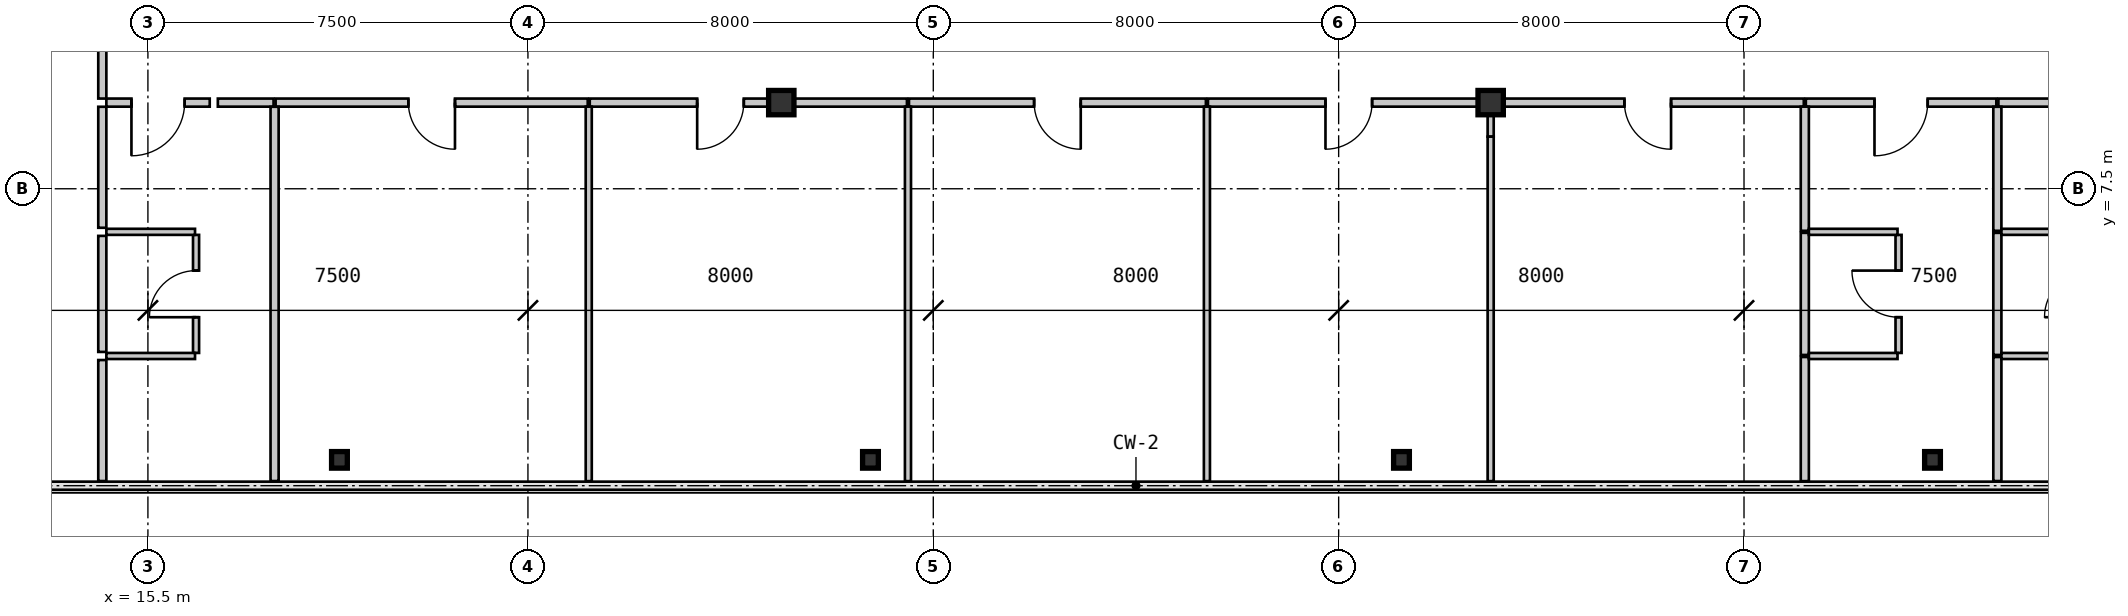
"""IFC4 building model, lengths in metres.
Left out: names, types, materials, properties, quantities, classifications, styles, units other than length and angle.
Written with IfcOpenShell. Run it as: python <this file> out.ifc"""

import sys

from ifc_helpers import new_model, si_unit, direction, frame, frame_2d, origin, origin_2d, place, context, subcontext, project, spatial, rectangle, i_section, extrude, source, transform, mapped, element, fill, save


model = new_model("IFC4")
c1 = context("Model", 3, precision=1e-05, world=origin(), true_north=direction((0.0, 1.0)))
c2 = subcontext(c1, "Body", "Model", "MODEL_VIEW")
j1 = project(units=[si_unit("LENGTHUNIT", "METRE"), si_unit("PLANEANGLEUNIT", "RADIAN")], contexts=[c1])
p1 = place(None, origin())
s1 = spatial("IfcSite", under=j1, at=p1, CompositionType="ELEMENT")
p2 = place(p1, origin())
s2 = spatial("IfcBuilding", under=s1, at=p2, CompositionType="ELEMENT")
p3 = place(p2, frame((0.0, 0.0, 51.45)))
s3 = spatial("IfcBuildingStorey", under=s2, at=p3, CompositionType="ELEMENT", Elevation=51.45)
m1 = source(origin(), c2, "Body", "SweptSolid", [
    extrude(i_section(OverallWidth=0.5, OverallDepth=0.48, WebThickness=0.028, FlangeThickness=0.044, at=origin_2d()), origin(), (0.0, 0.0, 1.0), 3.15),
])
for number, where, z_axis, x_axis in (
    (1, (28.0, 9.2, 0.0), (0.0, 0.0, 1.0), (1.0, 0.0, 0.0)),
    (2, (42.0, 9.2, 0.0), (0.0, 0.0, 1.0), (1.0, 0.0, 0.0)),
):
    element("IfcColumn", number, at=place(p3, frame(where, z_axis=z_axis, x_axis=x_axis)), inside=s3, PredefinedType="COLUMN", context=c2, shape_type="MappedRepresentation", body=[
        mapped(m1, transform((0.0, 0.0, 0.0), scale=1.0)),
    ])
m2 = source(origin(), c2, "Body", "SweptSolid", [
    extrude(i_section(OverallWidth=0.311, OverallDepth=0.327, WebThickness=0.016, FlangeThickness=0.025, at=origin_2d()), origin(), (0.0, 0.0, 1.0), 3.15),
])
for number, where, z_axis, x_axis in (
    (3, (19.28, 2.15, 0.0), (0.0, 0.0, 1.0), (1.0, 0.0, 0.0)),
    (4, (29.76, 2.15, 0.0), (0.0, 0.0, 1.0), (1.0, 0.0, 0.0)),
    (5, (40.24, 2.15, 0.0), (0.0, 0.0, 1.0), (1.0, 0.0, 0.0)),
    (6, (50.72, 2.15, 0.0), (0.0, 0.0, 1.0), (1.0, 0.0, 0.0)),
):
    element("IfcColumn", number, at=place(p3, frame(where, z_axis=z_axis, x_axis=x_axis)), inside=s3, PredefinedType="COLUMN", context=c2, shape_type="MappedRepresentation", body=[
        mapped(m2, transform((0.0, 0.0, 0.0), scale=1.0)),
    ])
m3 = source(origin(), c2, "Body", "SweptSolid", [
    extrude(rectangle(XDim=2.04, YDim=0.16, at=frame_2d((1.02, 0.0))), origin(), (0.0, 0.0, 1.0), 2.93),
])
p4 = place(p3, frame((16.72, 9.2, 0.0), z_axis=(0.0, 0.0, 1.0), x_axis=(-1.0, 0.0, 0.0)))
e7 = element("IfcWall", 7, at=p4, inside=s3, PredefinedType="PARTITIONING", context=c2, shape_type="MappedRepresentation", body=[
    mapped(m3, transform((0.0, 0.0, 0.0), scale=1.0)),
])
m4 = source(origin(), c2, "Body", "SweptSolid", [
    extrude(rectangle(XDim=1.05, YDim=2.1, at=frame_2d((0.525, 1.05))), frame((0.0, 0.09, 0.0), z_axis=(0.0, -1.0, 0.0), x_axis=(1.0, 0.0, 0.0)), (0.0, 0.0, 1.0), 0.18),
])
p5 = place(p4, frame((0.495, 0.0, 0.0)))
e8 = element("IfcOpeningElement", 8, at=p5, cuts=e7, PredefinedType="OPENING", context=c2, shape_type="MappedRepresentation", body=[
    mapped(m4, transform((0.0, 0.0, 0.0), scale=1.0)),
])
m5 = source(origin(), c2, "Body", "SweptSolid", [
    extrude(rectangle(XDim=8.7, YDim=0.16, at=frame_2d((4.35, 0.0))), origin(), (0.0, 0.0, 1.0), 2.93),
])
p6 = place(p3, frame((14.6, 9.28, 0.0), z_axis=(0.0, 0.0, 1.0), x_axis=(0.0, 1.0, 0.0)))
e9 = element("IfcWall", 9, at=p6, inside=s3, PredefinedType="PARTITIONING", context=c2, shape_type="MappedRepresentation", body=[
    mapped(m5, transform((0.0, 0.0, 0.0), scale=1.0)),
])
m6 = source(origin(), c2, "Body", "SweptSolid", [
    extrude(rectangle(XDim=0.92, YDim=2.1, at=frame_2d((0.46, 1.05))), frame((0.0, 0.09, 0.0), z_axis=(0.0, -1.0, 0.0), x_axis=(1.0, 0.0, 0.0)), (0.0, 0.0, 1.0), 0.18),
])
p7 = place(p6, frame((3.89, 0.0, 0.0)))
e10 = element("IfcOpeningElement", 10, at=p7, cuts=e9, PredefinedType="OPENING", context=c2, shape_type="MappedRepresentation", body=[
    mapped(m6, transform((0.0, 0.0, 0.0), scale=1.0)),
])
m7 = source(origin(), c2, "Body", "SweptSolid", [
    extrude(rectangle(XDim=1.1, YDim=0.16, at=frame_2d((0.55, 0.0))), origin(), (0.0, 0.0, 1.0), 2.93),
])
p8 = place(p3, frame((17.98, 9.2, 0.0), z_axis=(0.0, 0.0, 1.0), x_axis=(-1.0, 0.0, 0.0)))
e11 = element("IfcWall", 11, at=p8, inside=s3, PredefinedType="PARTITIONING", context=c2, shape_type="MappedRepresentation", body=[
    mapped(m7, transform((0.0, 0.0, 0.0), scale=1.0)),
])
m8 = source(origin(), c2, "Body", "SweptSolid", [
    extrude(rectangle(XDim=6.159, YDim=0.16, at=frame_2d((3.08, 0.0))), origin(), (0.0, 0.0, 1.0), 2.93),
])
p9 = place(p3, frame((24.18, 9.2, 0.0), z_axis=(0.0, 0.0, 1.0), x_axis=(-1.0, 0.0, 0.0)))
e12 = element("IfcWall", 12, at=p9, inside=s3, PredefinedType="PARTITIONING", context=c2, shape_type="MappedRepresentation", body=[
    mapped(m8, transform((0.0, 0.0, 0.0), scale=1.0)),
])
p10 = place(p9, frame((2.62, 0.0, 0.0)))
e13 = element("IfcOpeningElement", 13, at=p10, cuts=e12, PredefinedType="OPENING", context=c2, shape_type="MappedRepresentation", body=[
    mapped(m6, transform((0.0, 0.0, 0.0), scale=1.0)),
])
m9 = source(origin(), c2, "Body", "SweptSolid", [
    extrude(rectangle(XDim=2.48, YDim=0.16, at=frame_2d((1.24, 0.0))), origin(), (0.0, 0.0, 1.0), 2.328),
])
p11 = place(p3, frame((30.48, 9.2, 0.0), z_axis=(0.0, 0.0, 1.0), x_axis=(-1.0, 0.0, 0.0)))
e14 = element("IfcWall", 14, at=p11, inside=s3, PredefinedType="PARTITIONING", context=c2, shape_type="MappedRepresentation", body=[
    mapped(m9, transform((0.0, 0.0, 0.0), scale=1.0)),
])
m10 = source(origin(), c2, "Body", "SweptSolid", [
    extrude(rectangle(XDim=3.78, YDim=0.16, at=frame_2d((1.89, 0.0))), origin(), (0.0, 0.0, 1.0), 2.93),
])
p12 = place(p3, frame((28.0, 9.2, 0.0), z_axis=(0.0, 0.0, 1.0), x_axis=(-1.0, 0.0, 0.0)))
e15 = element("IfcWall", 15, at=p12, inside=s3, PredefinedType="PARTITIONING", context=c2, shape_type="MappedRepresentation", body=[
    mapped(m10, transform((0.0, 0.0, 0.0), scale=1.0)),
])
p13 = place(p12, frame((0.74, 0.0, 0.0)))
e16 = element("IfcOpeningElement", 16, at=p13, cuts=e15, PredefinedType="OPENING", context=c2, shape_type="MappedRepresentation", body=[
    mapped(m6, transform((0.0, 0.0, 0.0), scale=1.0)),
])
m11 = source(origin(), c2, "Body", "SweptSolid", [
    extrude(rectangle(XDim=5.86, YDim=0.16, at=frame_2d((2.93, 0.0))), origin(), (0.0, 0.0, 1.0), 2.328),
])
p14 = place(p3, frame((36.38, 9.2, 0.0), z_axis=(0.0, 0.0, 1.0), x_axis=(-1.0, 0.0, 0.0)))
e17 = element("IfcWall", 17, at=p14, inside=s3, PredefinedType="PARTITIONING", context=c2, shape_type="MappedRepresentation", body=[
    mapped(m11, transform((0.0, 0.0, 0.0), scale=1.0)),
])
p15 = place(p14, frame((2.47, 0.0, 0.0)))
e18 = element("IfcOpeningElement", 18, at=p15, cuts=e17, PredefinedType="OPENING", context=c2, shape_type="MappedRepresentation", body=[
    mapped(m6, transform((0.0, 0.0, 0.0), scale=1.0)),
])
m12 = source(origin(), c2, "Body", "SweptSolid", [
    extrude(rectangle(XDim=5.56, YDim=0.16, at=frame_2d((2.78, 0.0))), origin(), (0.0, 0.0, 1.0), 2.328),
])
p16 = place(p3, frame((41.98, 9.2, 0.0), z_axis=(0.0, 0.0, 1.0), x_axis=(-1.0, 0.0, 0.0)))
e19 = element("IfcWall", 19, at=p16, inside=s3, PredefinedType="PARTITIONING", context=c2, shape_type="MappedRepresentation", body=[
    mapped(m12, transform((0.0, 0.0, 0.0), scale=1.0)),
])
p17 = place(p16, frame((2.32, 0.0, 0.0)))
e20 = element("IfcOpeningElement", 20, at=p17, cuts=e19, PredefinedType="OPENING", context=c2, shape_type="MappedRepresentation", body=[
    mapped(m6, transform((0.0, 0.0, 0.0), scale=1.0)),
])
p18 = place(p3, frame((48.18, 9.2, 0.0), z_axis=(0.0, 0.0, 1.0), x_axis=(-1.0, 0.0, 0.0)))
e21 = element("IfcWall", 21, at=p18, inside=s3, PredefinedType="PARTITIONING", context=c2, shape_type="MappedRepresentation", body=[
    mapped(m8, transform((0.0, 0.0, 0.0), scale=1.0)),
])
p19 = place(p18, frame((2.62, 0.0, 0.0)))
e22 = element("IfcOpeningElement", 22, at=p19, cuts=e21, PredefinedType="OPENING", context=c2, shape_type="MappedRepresentation", body=[
    mapped(m6, transform((0.0, 0.0, 0.0), scale=1.0)),
])
m13 = source(origin(), c2, "Body", "SweptSolid", [
    extrude(rectangle(XDim=3.76, YDim=0.16, at=frame_2d((1.88, 0.0))), origin(), (0.0, 0.0, 1.0), 2.93),
])
p20 = place(p3, frame((51.98, 9.2, 0.0), z_axis=(0.0, 0.0, 1.0), x_axis=(-1.0, 0.0, 0.0)))
e23 = element("IfcWall", 23, at=p20, inside=s3, PredefinedType="PARTITIONING", context=c2, shape_type="MappedRepresentation", body=[
    mapped(m13, transform((0.0, 0.0, 0.0), scale=1.0)),
])
p21 = place(p20, frame((1.355, 0.0, 0.0)))
e24 = element("IfcOpeningElement", 24, at=p21, cuts=e23, PredefinedType="OPENING", context=c2, shape_type="MappedRepresentation", body=[
    mapped(m4, transform((0.0, 0.0, 0.0), scale=1.0)),
])
p22 = place(p3, frame((53.12, 9.2, 0.0), z_axis=(0.0, 0.0, 1.0), x_axis=(-1.0, 0.0, 0.0)))
e25 = element("IfcWall", 25, at=p22, inside=s3, PredefinedType="PARTITIONING", context=c2, shape_type="MappedRepresentation", body=[
    mapped(m7, transform((0.0, 0.0, 0.0), scale=1.0)),
])
m14 = source(origin(), c2, "Body", "SweptSolid", [
    extrude(rectangle(XDim=2.33, YDim=0.12, at=frame_2d((1.165, 0.0))), origin(), (0.0, 0.0, 1.0), 2.93),
])
p23 = place(p3, frame((16.45, 4.26, 0.0), z_axis=(0.0, 0.0, 1.0), x_axis=(0.0, 1.0, 0.0)))
e26 = element("IfcWall", 26, at=p23, inside=s3, PredefinedType="PARTITIONING", context=c2, shape_type="MappedRepresentation", body=[
    mapped(m14, transform((0.0, 0.0, 0.0), scale=1.0)),
])
m15 = source(origin(), c2, "Body", "SweptSolid", [
    extrude(rectangle(XDim=0.92, YDim=2.1, at=frame_2d((0.46, 1.05))), frame((0.0, 0.07, 0.0), z_axis=(0.0, -1.0, 0.0), x_axis=(1.0, 0.0, 0.0)), (0.0, 0.0, 1.0), 0.14),
])
p24 = place(p23, frame((0.705, 0.0, 0.0)))
e27 = element("IfcOpeningElement", 27, at=p24, cuts=e26, PredefinedType="OPENING", context=c2, shape_type="MappedRepresentation", body=[
    mapped(m15, transform((0.0, 0.0, 0.0), scale=1.0)),
])
m16 = source(origin(), c2, "Body", "SweptSolid", [
    extrude(rectangle(XDim=1.75, YDim=0.12, at=frame_2d((0.875, 0.0))), origin(), (0.0, 0.0, 1.0), 2.93),
])
for number, where, z_axis, x_axis in (
    (28, (14.68, 4.2, 0.0), (0.0, 0.0, 1.0), (1.0, 0.0, 0.0)),
    (29, (16.43, 6.65, 0.0), (0.0, 0.0, 1.0), (-1.0, 0.0, 0.0)),
):
    element("IfcWall", number, at=place(p3, frame(where, z_axis=z_axis, x_axis=x_axis)), inside=s3, PredefinedType="PARTITIONING", context=c2, shape_type="MappedRepresentation", body=[
        mapped(m16, transform((0.0, 0.0, 0.0), scale=1.0)),
    ])
m17 = source(origin(), c2, "Body", "SweptSolid", [
    extrude(rectangle(XDim=7.386, YDim=0.16, at=frame_2d((3.693, 0.0))), origin(), (0.0, 0.0, 1.0), 2.93),
])
p25 = place(p3, frame((18.0, 9.118, 0.0), z_axis=(0.0, 0.0, 1.0), x_axis=(0.0, -1.0, 0.0)))
e30 = element("IfcWall", 30, at=p25, inside=s3, PredefinedType="PARTITIONING", context=c2, shape_type="MappedRepresentation", body=[
    mapped(m17, transform((0.0, 0.0, 0.0), scale=1.0)),
])
m18 = source(origin(), c2, "Body", "SweptSolid", [
    extrude(rectangle(XDim=2.388, YDim=0.16, at=frame_2d((1.194, 0.0))), origin(), (0.0, 0.0, 1.0), 2.93),
])
p26 = place(p3, frame((14.6, 1.732, 0.0), z_axis=(0.0, 0.0, 1.0), x_axis=(0.0, 1.0, 0.0)))
e31 = element("IfcWall", 31, at=p26, inside=s3, PredefinedType="PARTITIONING", context=c2, shape_type="MappedRepresentation", body=[
    mapped(m18, transform((0.0, 0.0, 0.0), scale=1.0)),
])
m19 = source(origin(), c2, "Body", "SweptSolid", [
    extrude(rectangle(XDim=2.388, YDim=0.16, at=frame_2d((1.194, 0.0))), origin(), (0.0, 0.0, 1.0), 2.93),
])
p27 = place(p3, frame((14.6, 6.73, 0.0), z_axis=(0.0, 0.0, 1.0), x_axis=(0.0, 1.0, 0.0)))
e32 = element("IfcWall", 32, at=p27, inside=s3, PredefinedType="PARTITIONING", context=c2, shape_type="MappedRepresentation", body=[
    mapped(m19, transform((0.0, 0.0, 0.0), scale=1.0)),
])
m20 = source(origin(), c2, "Body", "SweptSolid", [
    extrude(rectangle(XDim=2.29, YDim=0.16, at=frame_2d((1.145, 0.0))), origin(), (0.0, 0.0, 1.0), 2.93),
])
p28 = place(p3, frame((14.6, 4.28, 0.0), z_axis=(0.0, 0.0, 1.0), x_axis=(0.0, 1.0, 0.0)))
e33 = element("IfcWall", 33, at=p28, inside=s3, PredefinedType="PARTITIONING", context=c2, shape_type="MappedRepresentation", body=[
    mapped(m20, transform((0.0, 0.0, 0.0), scale=1.0)),
])
m21 = source(origin(), c2, "Body", "SweptSolid", [
    extrude(rectangle(XDim=7.39, YDim=0.12, at=frame_2d((3.695, 0.0))), origin(), (0.0, 0.0, 1.0), 2.93),
])
for number, where, z_axis, x_axis in (
    (34, (24.2, 9.12, 0.0), (0.0, 0.0, 1.0), (0.0, -1.0, 0.0)),
    (35, (30.5, 9.12, 0.0), (0.0, 0.0, 1.0), (0.0, -1.0, 0.0)),
    (36, (36.4, 9.12, 0.0), (0.0, 0.0, 1.0), (0.0, -1.0, 0.0)),
):
    element("IfcWall", number, at=place(p3, frame(where, z_axis=z_axis, x_axis=x_axis)), inside=s3, PredefinedType="PARTITIONING", context=c2, shape_type="MappedRepresentation", body=[
        mapped(m21, transform((0.0, 0.0, 0.0), scale=1.0)),
    ])
m22 = source(origin(), c2, "Body", "SweptSolid", [
    extrude(rectangle(XDim=0.592, YDim=0.12, at=frame_2d((0.296, 0.0))), origin(), (0.0, 0.0, 1.0), 2.397),
])
p29 = place(p3, frame((42.0, 9.12, 0.0), z_axis=(0.0, 0.0, 1.0), x_axis=(0.0, -1.0, 0.0)))
e37 = element("IfcWall", 37, at=p29, inside=s3, PredefinedType="PARTITIONING", context=c2, shape_type="MappedRepresentation", body=[
    mapped(m22, transform((0.0, 0.0, 0.0), scale=1.0)),
])
m23 = source(origin(), c2, "Body", "SweptSolid", [
    extrude(rectangle(XDim=6.798, YDim=0.12, at=frame_2d((3.399, 0.0))), origin(), (0.0, 0.0, 1.0), 2.93),
])
p30 = place(p3, frame((42.0, 8.528, 0.0), z_axis=(0.0, 0.0, 1.0), x_axis=(0.0, -1.0, 0.0)))
e38 = element("IfcWall", 38, at=p30, inside=s3, PredefinedType="PARTITIONING", context=c2, shape_type="MappedRepresentation", body=[
    mapped(m23, transform((0.0, 0.0, 0.0), scale=1.0)),
])
m24 = source(origin(), c2, "Body", "SweptSolid", [
    extrude(rectangle(XDim=2.45, YDim=0.16, at=frame_2d((1.225, 0.0))), origin(), (0.0, 0.0, 1.0), 2.93),
])
p31 = place(p3, frame((48.2, 4.18, 0.0), z_axis=(0.0, 0.0, 1.0), x_axis=(0.0, -1.0, 0.0)))
e39 = element("IfcWall", 39, at=p31, inside=s3, PredefinedType="PARTITIONING", context=c2, shape_type="MappedRepresentation", body=[
    mapped(m24, transform((0.0, 0.0, 0.0), scale=1.0)),
])
m25 = source(origin(), c2, "Body", "SweptSolid", [
    extrude(rectangle(XDim=2.45, YDim=0.16, at=frame_2d((1.225, 0.0))), origin(), (0.0, 0.0, 1.0), 2.93),
])
p32 = place(p3, frame((48.2, 9.12, 0.0), z_axis=(0.0, 0.0, 1.0), x_axis=(0.0, -1.0, 0.0)))
e40 = element("IfcWall", 40, at=p32, inside=s3, PredefinedType="PARTITIONING", context=c2, shape_type="MappedRepresentation", body=[
    mapped(m25, transform((0.0, 0.0, 0.0), scale=1.0)),
])
m26 = source(origin(), c2, "Body", "SweptSolid", [
    extrude(rectangle(XDim=2.41, YDim=0.16, at=frame_2d((1.205, 0.0))), origin(), (0.0, 0.0, 1.0), 2.93),
])
p33 = place(p3, frame((48.2, 6.63, 0.0), z_axis=(0.0, 0.0, 1.0), x_axis=(0.0, -1.0, 0.0)))
e41 = element("IfcWall", 41, at=p33, inside=s3, PredefinedType="PARTITIONING", context=c2, shape_type="MappedRepresentation", body=[
    mapped(m26, transform((0.0, 0.0, 0.0), scale=1.0)),
])
p34 = place(p3, frame((50.05, 4.26, 0.0), z_axis=(0.0, 0.0, 1.0), x_axis=(0.0, 1.0, 0.0)))
e42 = element("IfcWall", 42, at=p34, inside=s3, PredefinedType="PARTITIONING", context=c2, shape_type="MappedRepresentation", body=[
    mapped(m14, transform((0.0, 0.0, 0.0), scale=1.0)),
])
p35 = place(p34, frame((0.705, 0.0, 0.0)))
e43 = element("IfcOpeningElement", 43, at=p35, cuts=e42, PredefinedType="OPENING", context=c2, shape_type="MappedRepresentation", body=[
    mapped(m15, transform((0.0, 0.0, 0.0), scale=1.0)),
])
for number, where, z_axis, x_axis in (
    (44, (48.28, 4.2, 0.0), (0.0, 0.0, 1.0), (1.0, 0.0, 0.0)),
    (45, (50.03, 6.65, 0.0), (0.0, 0.0, 1.0), (-1.0, 0.0, 0.0)),
):
    element("IfcWall", number, at=place(p3, frame(where, z_axis=z_axis, x_axis=x_axis)), inside=s3, PredefinedType="PARTITIONING", context=c2, shape_type="MappedRepresentation", body=[
        mapped(m16, transform((0.0, 0.0, 0.0), scale=1.0)),
    ])
m27 = source(origin(), c2, "Body", "SweptSolid", [
    extrude(rectangle(XDim=2.448, YDim=0.16, at=frame_2d((1.224, 0.0))), origin(), (0.0, 0.0, 1.0), 2.93),
])
for number, where, z_axis, x_axis in (
    (46, (52.0, 4.18, 0.0), (0.0, 0.0, 1.0), (0.0, -1.0, 0.0)),
    (47, (52.0, 9.118, 0.0), (0.0, 0.0, 1.0), (0.0, -1.0, 0.0)),
):
    element("IfcWall", number, at=place(p3, frame(where, z_axis=z_axis, x_axis=x_axis)), inside=s3, PredefinedType="PARTITIONING", context=c2, shape_type="MappedRepresentation", body=[
        mapped(m27, transform((0.0, 0.0, 0.0), scale=1.0)),
    ])
p36 = place(p3, frame((52.0, 6.63, 0.0), z_axis=(0.0, 0.0, 1.0), x_axis=(0.0, -1.0, 0.0)))
e48 = element("IfcWall", 48, at=p36, inside=s3, PredefinedType="PARTITIONING", context=c2, shape_type="MappedRepresentation", body=[
    mapped(m26, transform((0.0, 0.0, 0.0), scale=1.0)),
])
for number, where, z_axis, x_axis in (
    (49, (52.08, 4.2, 0.0), (0.0, 0.0, 1.0), (1.0, 0.0, 0.0)),
    (50, (53.83, 6.65, 0.0), (0.0, 0.0, 1.0), (-1.0, 0.0, 0.0)),
):
    element("IfcWall", number, at=place(p3, frame(where, z_axis=z_axis, x_axis=x_axis)), inside=s3, PredefinedType="PARTITIONING", context=c2, shape_type="MappedRepresentation", body=[
        mapped(m16, transform((0.0, 0.0, 0.0), scale=1.0)),
    ])
m28 = source(origin(), c2, "Body", "SweptSolid", [
    extrude(rectangle(XDim=1.05, YDim=2.1, at=frame_2d((0.525, 1.05))), frame((0.0, 0.025, 0.0), z_axis=(0.0, -1.0, 0.0), x_axis=(1.0, 0.0, 0.0)), (0.0, 0.0, 1.0), 0.05),
])
p37 = place(p5, origin())
e51 = element("IfcDoor", 51, at=p37, inside=s3, OperationType="SINGLE_SWING_RIGHT", PredefinedType="DOOR", context=c2, shape_type="MappedRepresentation", body=[
    mapped(m28, transform((0.0, 0.0, 0.0), scale=1.0)),
])
fill(e8, e51)
m29 = source(origin(), c2, "Body", "SweptSolid", [
    extrude(rectangle(XDim=0.92, YDim=2.1, at=frame_2d((0.46, 1.05))), frame((0.0, 0.025, 0.0), z_axis=(0.0, -1.0, 0.0), x_axis=(1.0, 0.0, 0.0)), (0.0, 0.0, 1.0), 0.05),
])
p38 = place(p10, origin())
e52 = element("IfcDoor", 52, at=p38, inside=s3, OperationType="SINGLE_SWING_LEFT", PredefinedType="DOOR", context=c2, shape_type="MappedRepresentation", body=[
    mapped(m29, transform((0.0, 0.0, 0.0), scale=1.0)),
])
fill(e13, e52)
p39 = place(p13, origin())
e53 = element("IfcDoor", 53, at=p39, inside=s3, OperationType="SINGLE_SWING_RIGHT", PredefinedType="DOOR", context=c2, shape_type="MappedRepresentation", body=[
    mapped(m29, transform((0.0, 0.0, 0.0), scale=1.0)),
])
fill(e16, e53)
p40 = place(p15, origin())
e54 = element("IfcDoor", 54, at=p40, inside=s3, OperationType="SINGLE_SWING_LEFT", PredefinedType="DOOR", context=c2, shape_type="MappedRepresentation", body=[
    mapped(m29, transform((0.0, 0.0, 0.0), scale=1.0)),
])
fill(e18, e54)
p41 = place(p17, origin())
e55 = element("IfcDoor", 55, at=p41, inside=s3, OperationType="SINGLE_SWING_RIGHT", PredefinedType="DOOR", context=c2, shape_type="MappedRepresentation", body=[
    mapped(m29, transform((0.0, 0.0, 0.0), scale=1.0)),
])
fill(e20, e55)
p42 = place(p19, origin())
e56 = element("IfcDoor", 56, at=p42, inside=s3, OperationType="SINGLE_SWING_LEFT", PredefinedType="DOOR", context=c2, shape_type="MappedRepresentation", body=[
    mapped(m29, transform((0.0, 0.0, 0.0), scale=1.0)),
])
fill(e22, e56)
p43 = place(p21, origin())
e57 = element("IfcDoor", 57, at=p43, inside=s3, OperationType="SINGLE_SWING_RIGHT", PredefinedType="DOOR", context=c2, shape_type="MappedRepresentation", body=[
    mapped(m28, transform((0.0, 0.0, 0.0), scale=1.0)),
])
fill(e24, e57)
p44 = place(p24, origin())
e58 = element("IfcDoor", 58, at=p44, inside=s3, OperationType="SINGLE_SWING_LEFT", PredefinedType="DOOR", context=c2, shape_type="MappedRepresentation", body=[
    mapped(m29, transform((0.0, 0.0, 0.0), scale=1.0)),
])
fill(e27, e58)
p45 = place(p35, origin())
e59 = element("IfcDoor", 59, at=p45, inside=s3, OperationType="SINGLE_SWING_RIGHT", PredefinedType="DOOR", context=c2, shape_type="MappedRepresentation", body=[
    mapped(m29, transform((0.0, 0.0, 0.0), scale=1.0)),
])
fill(e43, e59)
save(model, sys.argv[1])
